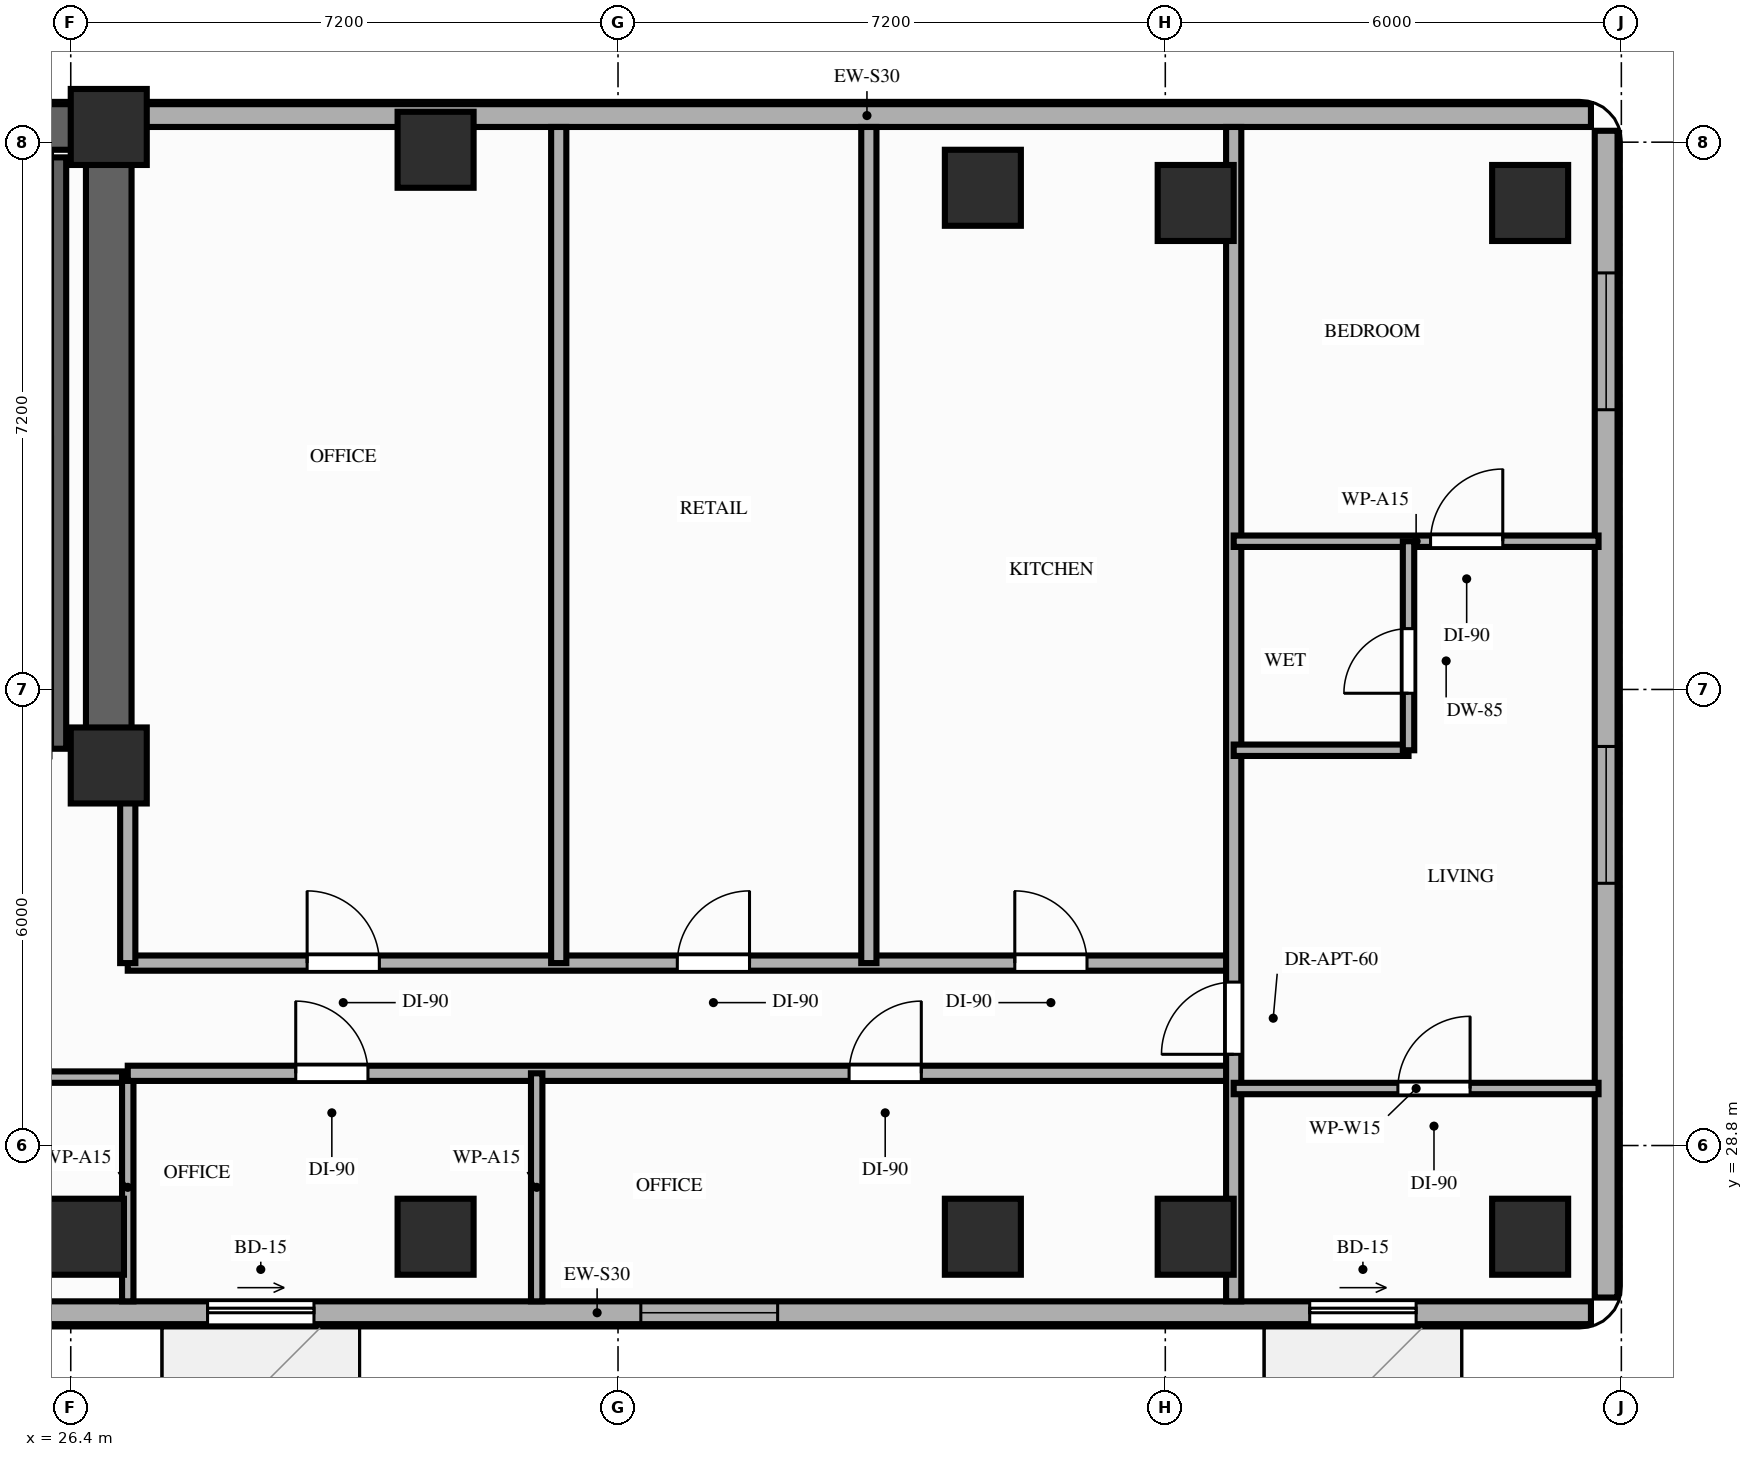
"""IFC4 building model, lengths in metres.
Left out: names, types, materials, properties, quantities, classifications, styles, units other than length and angle.
Written with IfcOpenShell. Run it as: python <this file> out.ifc"""

import sys

from ifc_helpers import new_model, si_unit, direction, frame, frame_2d, origin, origin_2d, place, context, subcontext, project, spatial, rectangle, extrude, element, fill, save


model = new_model("IFC4")
c1 = context("Model", 3, precision=1e-05, world=origin(), true_north=direction((0.0, 1.0)))
c2 = subcontext(c1, "Body", "Model", "MODEL_VIEW")
j1 = project(units=[si_unit("LENGTHUNIT", "METRE"), si_unit("PLANEANGLEUNIT", "RADIAN")], contexts=[c1])
p1 = place(None, origin())
s1 = spatial("IfcSite", under=j1, at=p1, CompositionType="ELEMENT")
p2 = place(p1, origin())
s2 = spatial("IfcBuilding", under=s1, at=p2, CompositionType="ELEMENT")
p3 = place(p2, frame((0.0, 0.0, 126.6)))
s3 = spatial("IfcBuildingStorey", under=s2, at=p3, CompositionType="ELEMENT", Elevation=126.6)
for number, where, z_axis, x_axis in (
    (1, (26.9, 33.8, 0.0), (0.0, 0.0, 1.0), (1.0, 0.0, 0.0)),
    (2, (26.9, 42.2, 0.0), (0.0, 0.0, 1.0), (1.0, 0.0, 0.0)),
    (3, (26.6, 27.6, 0.0), (0.0, 0.0, 1.0), (1.0, 0.0, 0.0)),
    (4, (31.2, 27.6, 0.0), (0.0, 0.0, 1.0), (1.0, 0.0, 0.0)),
    (5, (31.2, 41.9, 0.0), (0.0, 0.0, 1.0), (1.0, 0.0, 0.0)),
    (6, (38.4, 27.6, 0.0), (0.0, 0.0, 1.0), (1.0, 0.0, 0.0)),
    (7, (38.4, 41.4, 0.0), (0.0, 0.0, 1.0), (1.0, 0.0, 0.0)),
    (8, (41.2, 27.6, 0.0), (0.0, 0.0, 1.0), (1.0, 0.0, 0.0)),
    (9, (41.2, 41.2, 0.0), (0.0, 0.0, 1.0), (1.0, 0.0, 0.0)),
    (10, (45.6, 27.6, 0.0), (0.0, 0.0, 1.0), (1.0, 0.0, 0.0)),
    (11, (45.6, 41.2, 0.0), (0.0, 0.0, 1.0), (1.0, 0.0, 0.0)),
):
    element("IfcColumn", number, at=place(p3, frame(where, z_axis=z_axis, x_axis=x_axis)), inside=s3, PredefinedType="COLUMN", context=c2, shape_type="SweptSolid", body=[
        extrude(rectangle(XDim=1.0, YDim=1.0, at=origin_2d()), origin(), (0.0, 0.0, 1.0), 3.2),
    ])
p4 = place(p3, frame((46.4, 42.35, 0.0), z_axis=(0.0, 0.0, 1.0), x_axis=(-1.0, 0.0, 0.0)))
e12 = element("IfcWall", 12, at=p4, inside=s3, PredefinedType="STANDARD", context=c2, shape_type="SweptSolid", body=[
    extrude(rectangle(XDim=19.05, YDim=0.3, at=frame_2d((9.525, 0.0))), origin(), (0.0, 0.0, 1.0), 2.45),
])
p5 = place(p3, frame((20.25, 26.6, 0.0), z_axis=(0.0, 0.0, 1.0), x_axis=(1.0, 0.0, 0.0)))
e13 = element("IfcWall", 13, at=p5, inside=s3, PredefinedType="STANDARD", context=c2, shape_type="SweptSolid", body=[
    extrude(rectangle(XDim=26.15, YDim=0.3, at=frame_2d((13.075, 0.0))), origin(), (0.0, 0.0, 1.0), 2.71),
])
p6 = place(p5, frame((7.95, 0.0, 0.0)))
e14 = element("IfcOpeningElement", 14, at=p6, cuts=e13, PredefinedType="OPENING", context=c2, shape_type="SweptSolid", body=[
    extrude(rectangle(XDim=1.4, YDim=2.1, at=frame_2d((0.7, 1.05))), frame((0.0, 0.16, 0.0), z_axis=(0.0, -1.0, 0.0), x_axis=(1.0, 0.0, 0.0)), (0.0, 0.0, 1.0), 0.32),
])
p7 = place(p5, frame((22.45, 0.0, 0.0)))
e15 = element("IfcOpeningElement", 15, at=p7, cuts=e13, PredefinedType="OPENING", context=c2, shape_type="SweptSolid", body=[
    extrude(rectangle(XDim=1.4, YDim=2.1, at=frame_2d((0.7, 1.05))), frame((0.0, 0.16, 0.0), z_axis=(0.0, -1.0, 0.0), x_axis=(1.0, 0.0, 0.0)), (0.0, 0.0, 1.0), 0.32),
])
p8 = place(p5, frame((2.25, 0.0, 0.85)))
e16 = element("IfcOpeningElement", 16, at=p8, cuts=e13, PredefinedType="OPENING", context=c2, shape_type="SweptSolid", body=[
    extrude(rectangle(XDim=1.8, YDim=1.61, at=frame_2d((0.9, 0.805))), frame((0.0, 0.16, 0.0), z_axis=(0.0, -1.0, 0.0), x_axis=(1.0, 0.0, 0.0)), (0.0, 0.0, 1.0), 0.32),
])
p9 = place(p5, frame((13.65, 0.0, 0.85)))
e17 = element("IfcOpeningElement", 17, at=p9, cuts=e13, PredefinedType="OPENING", context=c2, shape_type="SweptSolid", body=[
    extrude(rectangle(XDim=1.8, YDim=1.61, at=frame_2d((0.9, 0.805))), frame((0.0, 0.16, 0.0), z_axis=(0.0, -1.0, 0.0), x_axis=(1.0, 0.0, 0.0)), (0.0, 0.0, 1.0), 0.32),
])
p10 = place(p3, frame((46.6, 26.8, 0.0), z_axis=(0.0, 0.0, 1.0), x_axis=(0.0, 1.0, 0.0)))
e18 = element("IfcWall", 18, at=p10, inside=s3, PredefinedType="STANDARD", context=c2, shape_type="SweptSolid", body=[
    extrude(rectangle(XDim=15.35, YDim=0.3, at=frame_2d((7.675, 0.0))), origin(), (0.0, 0.0, 1.0), 3.02),
])
p11 = place(p10, frame((5.45, 0.0, 0.85)))
e19 = element("IfcOpeningElement", 19, at=p11, cuts=e18, PredefinedType="OPENING", context=c2, shape_type="SweptSolid", body=[
    extrude(rectangle(XDim=1.8, YDim=1.75, at=frame_2d((0.9, 0.875))), frame((0.0, 0.16, 0.0), z_axis=(0.0, -1.0, 0.0), x_axis=(1.0, 0.0, 0.0)), (0.0, 0.0, 1.0), 0.32),
])
p12 = place(p10, frame((11.68, 0.0, 0.85)))
e20 = element("IfcOpeningElement", 20, at=p12, cuts=e18, PredefinedType="OPENING", context=c2, shape_type="SweptSolid", body=[
    extrude(rectangle(XDim=1.8, YDim=1.75, at=frame_2d((0.9, 0.875))), frame((0.0, 0.16, 0.0), z_axis=(0.0, -1.0, 0.0), x_axis=(1.0, 0.0, 0.0)), (0.0, 0.0, 1.0), 0.32),
])
p13 = place(p3, frame((6.45, 42.2, 0.0), z_axis=(0.0, 0.0, 1.0), x_axis=(1.0, 0.0, 0.0)))
e21 = element("IfcWall", 21, at=p13, inside=s3, PredefinedType="SHEAR", context=c2, shape_type="SweptSolid", body=[
    extrude(rectangle(XDim=20.45, YDim=0.6, at=frame_2d((10.225, 0.0))), origin(), (0.0, 0.0, 1.0), 3.02),
])
p14 = place(p3, frame((26.9, 33.8, 0.0), z_axis=(0.0, 0.0, 1.0), x_axis=(0.0, 1.0, 0.0)))
e22 = element("IfcWall", 22, at=p14, inside=s3, PredefinedType="SHEAR", context=c2, shape_type="SweptSolid", body=[
    extrude(rectangle(XDim=7.95, YDim=0.6, at=frame_2d((3.975, 0.0))), origin(), (0.0, 0.0, 1.0), 3.02),
])
p15 = place(p3, frame((26.24, 34.02, 0.0), z_axis=(0.0, 0.0, 1.0), x_axis=(0.0, 1.0, 0.0)))
e23 = element("IfcWall", 23, at=p15, inside=s3, PredefinedType="SHEAR", context=c2, shape_type="SweptSolid", body=[
    extrude(rectangle(XDim=7.78, YDim=0.2, at=frame_2d((3.89, 0.0))), origin(), (0.0, 0.0, 1.0), 3.02),
])
p16 = place(p3, frame((20.45, 29.7, 0.0), z_axis=(0.0, 0.0, 1.0), x_axis=(1.0, 0.0, 0.0)))
e24 = element("IfcWall", 24, at=p16, inside=s3, PredefinedType="PARTITIONING", context=c2, shape_type="SweptSolid", body=[
    extrude(rectangle(XDim=6.7, YDim=0.15, at=frame_2d((3.35, 0.0))), origin(), (0.0, 0.0, 1.0), 3.02),
])
p17 = place(p16, frame((2.8, 0.0, 0.0)))
e25 = element("IfcOpeningElement", 25, at=p17, cuts=e24, PredefinedType="OPENING", context=c2, shape_type="SweptSolid", body=[
    extrude(rectangle(XDim=0.95, YDim=2.15, at=frame_2d((0.475, 1.075))), frame((0.0, 0.085, 0.0), z_axis=(0.0, -1.0, 0.0), x_axis=(1.0, 0.0, 0.0)), (0.0, 0.0, 1.0), 0.17),
])
p18 = place(p3, frame((27.15, 26.75, 0.0), z_axis=(0.0, 0.0, 1.0), x_axis=(0.0, 1.0, 0.0)))
e26 = element("IfcWall", 26, at=p18, inside=s3, PredefinedType="PARTITIONING", context=c2, shape_type="SweptSolid", body=[
    extrude(rectangle(XDim=3.0, YDim=0.15, at=frame_2d((1.5, 0.0))), origin(), (0.0, 0.0, 1.0), 2.45),
])
p19 = place(p3, frame((27.15, 29.75, 0.0), z_axis=(0.0, 0.0, 1.0), x_axis=(1.0, 0.0, 0.0)))
e27 = element("IfcWall", 27, at=p19, inside=s3, PredefinedType="PARTITIONING", context=c2, shape_type="SweptSolid", body=[
    extrude(rectangle(XDim=14.55, YDim=0.2, at=frame_2d((7.275, 0.0))), origin(), (0.0, 0.0, 1.0), 2.45),
])
p20 = place(p19, frame((2.21, 0.0, 0.0)))
e28 = element("IfcOpeningElement", 28, at=p20, cuts=e27, PredefinedType="OPENING", context=c2, shape_type="SweptSolid", body=[
    extrude(rectangle(XDim=0.95, YDim=2.15, at=frame_2d((0.475, 1.075))), frame((0.0, 0.11, 0.0), z_axis=(0.0, -1.0, 0.0), x_axis=(1.0, 0.0, 0.0)), (0.0, 0.0, 1.0), 0.22),
])
p21 = place(p19, frame((9.49, 0.0, 0.0)))
e29 = element("IfcOpeningElement", 29, at=p21, cuts=e27, PredefinedType="OPENING", context=c2, shape_type="SweptSolid", body=[
    extrude(rectangle(XDim=0.95, YDim=2.15, at=frame_2d((0.475, 1.075))), frame((0.0, 0.11, 0.0), z_axis=(0.0, -1.0, 0.0), x_axis=(1.0, 0.0, 0.0)), (0.0, 0.0, 1.0), 0.22),
])
p22 = place(p3, frame((27.15, 31.2, 0.0), z_axis=(0.0, 0.0, 1.0), x_axis=(1.0, 0.0, 0.0)))
e30 = element("IfcWall", 30, at=p22, inside=s3, PredefinedType="PARTITIONING", context=c2, shape_type="SweptSolid", body=[
    extrude(rectangle(XDim=14.55, YDim=0.2, at=frame_2d((7.275, 0.0))), origin(), (0.0, 0.0, 1.0), 2.45),
])
p23 = place(p22, frame((2.36, 0.0, 0.0)))
e31 = element("IfcOpeningElement", 31, at=p23, cuts=e30, PredefinedType="OPENING", context=c2, shape_type="SweptSolid", body=[
    extrude(rectangle(XDim=0.95, YDim=2.15, at=frame_2d((0.475, 1.075))), frame((0.0, 0.11, 0.0), z_axis=(0.0, -1.0, 0.0), x_axis=(1.0, 0.0, 0.0)), (0.0, 0.0, 1.0), 0.22),
])
p24 = place(p22, frame((7.23, 0.0, 0.0)))
e32 = element("IfcOpeningElement", 32, at=p24, cuts=e30, PredefinedType="OPENING", context=c2, shape_type="SweptSolid", body=[
    extrude(rectangle(XDim=0.95, YDim=2.15, at=frame_2d((0.475, 1.075))), frame((0.0, 0.11, 0.0), z_axis=(0.0, -1.0, 0.0), x_axis=(1.0, 0.0, 0.0)), (0.0, 0.0, 1.0), 0.22),
])
p25 = place(p22, frame((11.67, 0.0, 0.0)))
e33 = element("IfcOpeningElement", 33, at=p25, cuts=e30, PredefinedType="OPENING", context=c2, shape_type="SweptSolid", body=[
    extrude(rectangle(XDim=0.95, YDim=2.15, at=frame_2d((0.475, 1.075))), frame((0.0, 0.11, 0.0), z_axis=(0.0, -1.0, 0.0), x_axis=(1.0, 0.0, 0.0)), (0.0, 0.0, 1.0), 0.22),
])
p26 = place(p3, frame((27.15, 31.2, 0.0), z_axis=(0.0, 0.0, 1.0), x_axis=(0.0, 1.0, 0.0)))
e34 = element("IfcWall", 34, at=p26, inside=s3, PredefinedType="PARTITIONING", context=c2, shape_type="SweptSolid", body=[
    extrude(rectangle(XDim=2.48, YDim=0.2, at=frame_2d((1.24, 0.0))), origin(), (0.0, 0.0, 1.0), 2.45),
])
p27 = place(p3, frame((41.7, 26.75, 0.0), z_axis=(0.0, 0.0, 1.0), x_axis=(0.0, 1.0, 0.0)))
e35 = element("IfcWall", 35, at=p27, inside=s3, PredefinedType="PARTITIONING", context=c2, shape_type="SweptSolid", body=[
    extrude(rectangle(XDim=15.45, YDim=0.2, at=frame_2d((7.725, 0.0))), origin(), (0.0, 0.0, 1.0), 2.45),
])
p28 = place(p27, frame((3.25, 0.0, 0.0)))
e36 = element("IfcOpeningElement", 36, at=p28, cuts=e35, PredefinedType="OPENING", context=c2, shape_type="SweptSolid", body=[
    extrude(rectangle(XDim=0.95, YDim=2.15, at=frame_2d((0.475, 1.075))), frame((0.0, 0.11, 0.0), z_axis=(0.0, -1.0, 0.0), x_axis=(1.0, 0.0, 0.0)), (0.0, 0.0, 1.0), 0.22),
])
p29 = place(p3, frame((41.7, 29.55, 0.0), z_axis=(0.0, 0.0, 1.0), x_axis=(1.0, 0.0, 0.0)))
e37 = element("IfcWall", 37, at=p29, inside=s3, PredefinedType="PARTITIONING", context=c2, shape_type="SweptSolid", body=[
    extrude(rectangle(XDim=4.8, YDim=0.15, at=frame_2d((2.4, 0.0))), origin(), (0.0, 0.0, 1.0), 2.45),
])
p30 = place(p29, frame((2.16, 0.0, 0.0)))
e38 = element("IfcOpeningElement", 38, at=p30, cuts=e37, PredefinedType="OPENING", context=c2, shape_type="SweptSolid", body=[
    extrude(rectangle(XDim=0.95, YDim=2.15, at=frame_2d((0.475, 1.075))), frame((0.0, 0.085, 0.0), z_axis=(0.0, -1.0, 0.0), x_axis=(1.0, 0.0, 0.0)), (0.0, 0.0, 1.0), 0.17),
])
p31 = place(p3, frame((41.7, 36.75, 0.0), z_axis=(0.0, 0.0, 1.0), x_axis=(1.0, 0.0, 0.0)))
e39 = element("IfcWall", 39, at=p31, inside=s3, PredefinedType="PARTITIONING", context=c2, shape_type="SweptSolid", body=[
    extrude(rectangle(XDim=4.8, YDim=0.15, at=frame_2d((2.4, 0.0))), origin(), (0.0, 0.0, 1.0), 2.45),
])
p32 = place(p31, frame((2.59, 0.0, 0.0)))
e40 = element("IfcOpeningElement", 40, at=p32, cuts=e39, PredefinedType="OPENING", context=c2, shape_type="SweptSolid", body=[
    extrude(rectangle(XDim=0.95, YDim=2.15, at=frame_2d((0.475, 1.075))), frame((0.0, 0.085, 0.0), z_axis=(0.0, -1.0, 0.0), x_axis=(1.0, 0.0, 0.0)), (0.0, 0.0, 1.0), 0.17),
])
p33 = place(p3, frame((41.7, 34.0, 0.0), z_axis=(0.0, 0.0, 1.0), x_axis=(1.0, 0.0, 0.0)))
e41 = element("IfcWall", 41, at=p33, inside=s3, PredefinedType="PARTITIONING", context=c2, shape_type="SweptSolid", body=[
    extrude(rectangle(XDim=2.3, YDim=0.15, at=frame_2d((1.15, 0.0))), origin(), (0.0, 0.0, 1.0), 3.02),
])
p34 = place(p3, frame((44.0, 34.0, 0.0), z_axis=(0.0, 0.0, 1.0), x_axis=(0.0, 1.0, 0.0)))
e42 = element("IfcWall", 42, at=p34, inside=s3, PredefinedType="PARTITIONING", context=c2, shape_type="SweptSolid", body=[
    extrude(rectangle(XDim=2.75, YDim=0.15, at=frame_2d((1.375, 0.0))), origin(), (0.0, 0.0, 1.0), 2.61),
])
p35 = place(p34, frame((0.75, 0.0, 0.0)))
e43 = element("IfcOpeningElement", 43, at=p35, cuts=e42, PredefinedType="OPENING", context=c2, shape_type="SweptSolid", body=[
    extrude(rectangle(XDim=0.85, YDim=2.1, at=frame_2d((0.425, 1.05))), frame((0.0, 0.085, 0.0), z_axis=(0.0, -1.0, 0.0), x_axis=(1.0, 0.0, 0.0)), (0.0, 0.0, 1.0), 0.17),
])
p36 = place(p3, frame((32.53, 26.75, 0.0), z_axis=(0.0, 0.0, 1.0), x_axis=(0.0, 1.0, 0.0)))
e44 = element("IfcWall", 44, at=p36, inside=s3, PredefinedType="PARTITIONING", context=c2, shape_type="SweptSolid", body=[
    extrude(rectangle(XDim=3.0, YDim=0.15, at=frame_2d((1.5, 0.0))), origin(), (0.0, 0.0, 1.0), 2.45),
])
for number, where, z_axis, x_axis in (
    (45, (32.82, 31.2, 0.0), (0.0, 0.0, 1.0), (0.0, 1.0, 0.0)),
    (46, (36.9, 31.2, 0.0), (0.0, 0.0, 1.0), (0.0, 1.0, 0.0)),
):
    element("IfcWall", number, at=place(p3, frame(where, z_axis=z_axis, x_axis=x_axis)), inside=s3, PredefinedType="PARTITIONING", context=c2, shape_type="SweptSolid", body=[
        extrude(rectangle(XDim=11.0, YDim=0.2, at=frame_2d((5.5, 0.0))), origin(), (0.0, 0.0, 1.0), 2.45),
    ])
p37 = place(p6, origin())
e47 = element("IfcDoor", 47, at=p37, inside=s3, OperationType="SLIDING_TO_RIGHT", PredefinedType="DOOR", context=c2, shape_type="SweptSolid", body=[
    extrude(rectangle(XDim=1.4, YDim=2.1, at=frame_2d((0.7, 1.05))), frame((0.0, 0.025, 0.0), z_axis=(0.0, -1.0, 0.0), x_axis=(1.0, 0.0, 0.0)), (0.0, 0.0, 1.0), 0.05),
])
fill(e14, e47)
p38 = place(p7, origin())
e48 = element("IfcDoor", 48, at=p38, inside=s3, OperationType="SLIDING_TO_RIGHT", PredefinedType="DOOR", context=c2, shape_type="SweptSolid", body=[
    extrude(rectangle(XDim=1.4, YDim=2.1, at=frame_2d((0.7, 1.05))), frame((0.0, 0.025, 0.0), z_axis=(0.0, -1.0, 0.0), x_axis=(1.0, 0.0, 0.0)), (0.0, 0.0, 1.0), 0.05),
])
fill(e15, e48)
p39 = place(p11, origin())
e49 = element("IfcWindow", 49, at=p39, inside=s3, PartitioningType="SINGLE_PANEL", PredefinedType="WINDOW", context=c2, shape_type="SweptSolid", body=[
    extrude(rectangle(XDim=1.8, YDim=1.75, at=frame_2d((0.9, 0.875))), frame((0.0, 0.03, 0.0), z_axis=(0.0, -1.0, 0.0), x_axis=(1.0, 0.0, 0.0)), (0.0, 0.0, 1.0), 0.06),
])
fill(e19, e49)
p40 = place(p12, origin())
e50 = element("IfcWindow", 50, at=p40, inside=s3, PartitioningType="SINGLE_PANEL", PredefinedType="WINDOW", context=c2, shape_type="SweptSolid", body=[
    extrude(rectangle(XDim=1.8, YDim=1.75, at=frame_2d((0.9, 0.875))), frame((0.0, 0.03, 0.0), z_axis=(0.0, -1.0, 0.0), x_axis=(1.0, 0.0, 0.0)), (0.0, 0.0, 1.0), 0.06),
])
fill(e20, e50)
p41 = place(p9, origin())
e51 = element("IfcWindow", 51, at=p41, inside=s3, PartitioningType="SINGLE_PANEL", PredefinedType="WINDOW", context=c2, shape_type="SweptSolid", body=[
    extrude(rectangle(XDim=1.8, YDim=1.61, at=frame_2d((0.9, 0.805))), frame((0.0, 0.03, 0.0), z_axis=(0.0, -1.0, 0.0), x_axis=(1.0, 0.0, 0.0)), (0.0, 0.0, 1.0), 0.06),
])
fill(e17, e51)
p42 = place(p28, origin())
e52 = element("IfcDoor", 52, at=p42, inside=s3, OperationType="SINGLE_SWING_LEFT", PredefinedType="DOOR", context=c2, shape_type="SweptSolid", body=[
    extrude(rectangle(XDim=0.95, YDim=2.15, at=frame_2d((0.475, 1.075))), frame((0.0, 0.025, 0.0), z_axis=(0.0, -1.0, 0.0), x_axis=(1.0, 0.0, 0.0)), (0.0, 0.0, 1.0), 0.05),
])
fill(e36, e52)
p43 = place(p32, origin())
e53 = element("IfcDoor", 53, at=p43, inside=s3, OperationType="SINGLE_SWING_RIGHT", PredefinedType="DOOR", context=c2, shape_type="SweptSolid", body=[
    extrude(rectangle(XDim=0.95, YDim=2.15, at=frame_2d((0.475, 1.075))), frame((0.0, 0.025, 0.0), z_axis=(0.0, -1.0, 0.0), x_axis=(1.0, 0.0, 0.0)), (0.0, 0.0, 1.0), 0.05),
])
fill(e40, e53)
p44 = place(p35, origin())
e54 = element("IfcDoor", 54, at=p44, inside=s3, OperationType="SINGLE_SWING_LEFT", PredefinedType="DOOR", context=c2, shape_type="SweptSolid", body=[
    extrude(rectangle(XDim=0.85, YDim=2.1, at=frame_2d((0.425, 1.05))), frame((0.0, 0.025, 0.0), z_axis=(0.0, -1.0, 0.0), x_axis=(1.0, 0.0, 0.0)), (0.0, 0.0, 1.0), 0.05),
])
fill(e43, e54)
p45 = place(p30, origin())
e55 = element("IfcDoor", 55, at=p45, inside=s3, OperationType="SINGLE_SWING_RIGHT", PredefinedType="DOOR", context=c2, shape_type="SweptSolid", body=[
    extrude(rectangle(XDim=0.95, YDim=2.15, at=frame_2d((0.475, 1.075))), frame((0.0, 0.025, 0.0), z_axis=(0.0, -1.0, 0.0), x_axis=(1.0, 0.0, 0.0)), (0.0, 0.0, 1.0), 0.05),
])
fill(e38, e55)
p46 = place(p20, origin())
e56 = element("IfcDoor", 56, at=p46, inside=s3, OperationType="SINGLE_SWING_LEFT", PredefinedType="DOOR", context=c2, shape_type="SweptSolid", body=[
    extrude(rectangle(XDim=0.95, YDim=2.15, at=frame_2d((0.475, 1.075))), frame((0.0, 0.025, 0.0), z_axis=(0.0, -1.0, 0.0), x_axis=(1.0, 0.0, 0.0)), (0.0, 0.0, 1.0), 0.05),
])
fill(e28, e56)
p47 = place(p21, origin())
e57 = element("IfcDoor", 57, at=p47, inside=s3, OperationType="SINGLE_SWING_RIGHT", PredefinedType="DOOR", context=c2, shape_type="SweptSolid", body=[
    extrude(rectangle(XDim=0.95, YDim=2.15, at=frame_2d((0.475, 1.075))), frame((0.0, 0.025, 0.0), z_axis=(0.0, -1.0, 0.0), x_axis=(1.0, 0.0, 0.0)), (0.0, 0.0, 1.0), 0.05),
])
fill(e29, e57)
p48 = place(p23, origin())
e58 = element("IfcDoor", 58, at=p48, inside=s3, OperationType="SINGLE_SWING_LEFT", PredefinedType="DOOR", context=c2, shape_type="SweptSolid", body=[
    extrude(rectangle(XDim=0.95, YDim=2.15, at=frame_2d((0.475, 1.075))), frame((0.0, 0.025, 0.0), z_axis=(0.0, -1.0, 0.0), x_axis=(1.0, 0.0, 0.0)), (0.0, 0.0, 1.0), 0.05),
])
fill(e31, e58)
p49 = place(p24, origin())
e59 = element("IfcDoor", 59, at=p49, inside=s3, OperationType="SINGLE_SWING_RIGHT", PredefinedType="DOOR", context=c2, shape_type="SweptSolid", body=[
    extrude(rectangle(XDim=0.95, YDim=2.15, at=frame_2d((0.475, 1.075))), frame((0.0, 0.025, 0.0), z_axis=(0.0, -1.0, 0.0), x_axis=(1.0, 0.0, 0.0)), (0.0, 0.0, 1.0), 0.05),
])
fill(e32, e59)
p50 = place(p25, origin())
e60 = element("IfcDoor", 60, at=p50, inside=s3, OperationType="SINGLE_SWING_LEFT", PredefinedType="DOOR", context=c2, shape_type="SweptSolid", body=[
    extrude(rectangle(XDim=0.95, YDim=2.15, at=frame_2d((0.475, 1.075))), frame((0.0, 0.025, 0.0), z_axis=(0.0, -1.0, 0.0), x_axis=(1.0, 0.0, 0.0)), (0.0, 0.0, 1.0), 0.05),
])
fill(e33, e60)
save(model, sys.argv[1])
